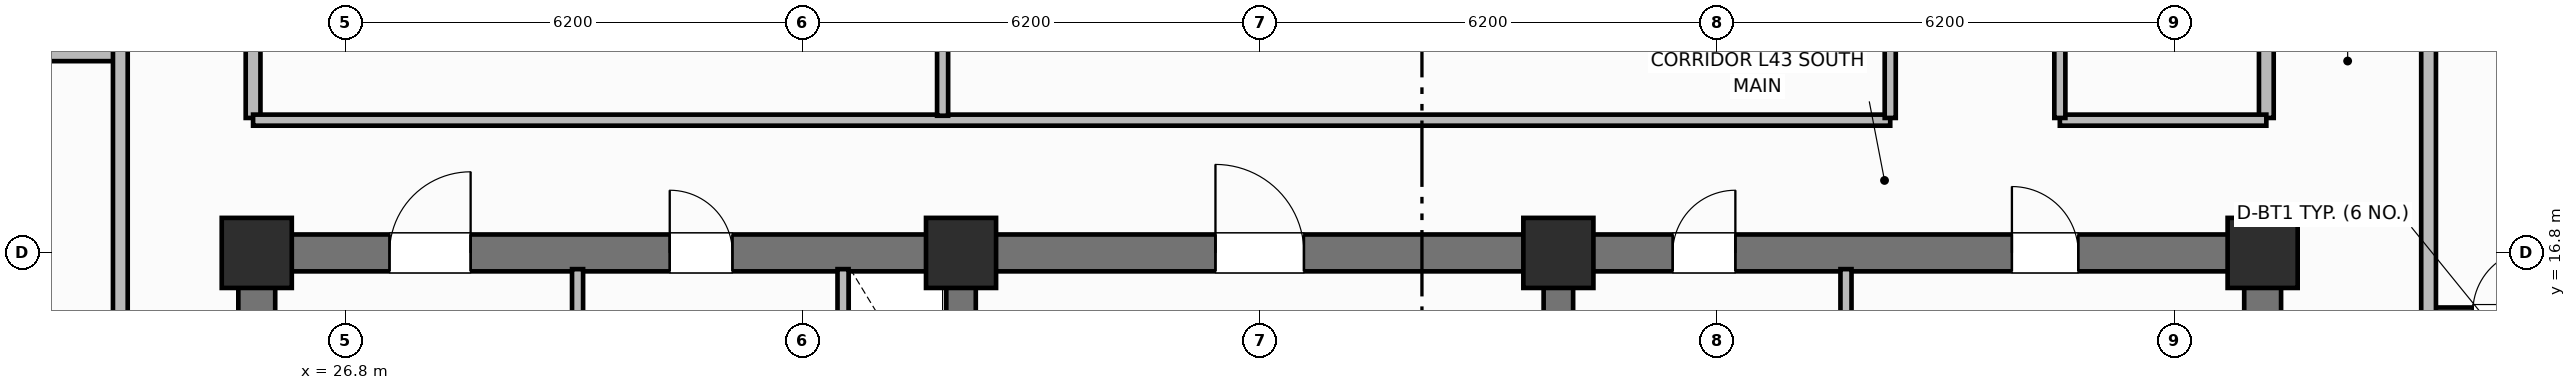
"""IFC4 building model, lengths in metres.
Left out: names, types, materials, properties, quantities, classifications, styles, units other than length and angle.
Written with IfcOpenShell. Run it as: python <this file> out.ifc"""

import sys

from ifc_helpers import new_model, si_unit, direction, frame, frame_2d, origin, origin_2d, place, context, subcontext, project, spatial, rectangle, extrude, element, fill, save


model = new_model("IFC4")
c1 = context("Model", 3, precision=1e-05, world=origin(), true_north=direction((0.0, 1.0)))
c2 = subcontext(c1, "Body", "Model", "MODEL_VIEW")
j1 = project(units=[si_unit("LENGTHUNIT", "METRE"), si_unit("PLANEANGLEUNIT", "RADIAN")], contexts=[c1])
p1 = place(None, origin())
s1 = spatial("IfcSite", under=j1, at=p1, CompositionType="ELEMENT")
p2 = place(p1, origin())
s2 = spatial("IfcBuilding", under=s1, at=p2, CompositionType="ELEMENT")
p3 = place(p2, frame((0.0, 0.0, 173.7)))
s3 = spatial("IfcBuildingStorey", under=s2, at=p3, CompositionType="ELEMENT", Elevation=173.7)
for number, where, z_axis, x_axis in (
    (1, (25.6, 10.85, 0.0), (0.0, 0.0, 1.0), (0.0, 1.0, 0.0)),
    (2, (52.8, 10.85, 0.0), (0.0, 0.0, 1.0), (0.0, 1.0, 0.0)),
):
    element("IfcWall", number, at=place(p3, frame(where, z_axis=z_axis, x_axis=x_axis)), inside=s3, PredefinedType="SHEAR", context=c2, shape_type="SweptSolid", body=[
        extrude(rectangle(XDim=5.7, YDim=0.5, at=frame_2d((2.85, 0.0))), origin(), (0.0, 0.0, 1.0), 3.7),
    ])
p4 = place(p3, frame((25.6, 16.8, 0.0), z_axis=(0.0, 0.0, 1.0), x_axis=(1.0, 0.0, 0.0)))
e3 = element("IfcWall", 3, at=p4, inside=s3, PredefinedType="SHEAR", context=c2, shape_type="SweptSolid", body=[
    extrude(rectangle(XDim=27.2, YDim=0.5, at=frame_2d((13.6, 0.0))), origin(), (0.0, 0.0, 1.0), 3.7),
])
p5 = place(p4, frame((1.8, 0.0, 0.0)))
e4 = element("IfcOpeningElement", 4, at=p5, cuts=e3, PredefinedType="OPENING", context=c2, shape_type="SweptSolid", body=[
    extrude(rectangle(XDim=1.1, YDim=2.15, at=frame_2d((0.55, 1.075))), frame((0.0, 0.26, 0.0), z_axis=(0.0, -1.0, 0.0), x_axis=(1.0, 0.0, 0.0)), (0.0, 0.0, 1.0), 0.52),
])
p6 = place(p4, frame((5.6, 0.0, 0.0)))
e5 = element("IfcOpeningElement", 5, at=p6, cuts=e3, PredefinedType="OPENING", context=c2, shape_type="SweptSolid", body=[
    extrude(rectangle(XDim=0.85, YDim=2.1, at=frame_2d((0.425, 1.05))), frame((0.0, 0.26, 0.0), z_axis=(0.0, -1.0, 0.0), x_axis=(1.0, 0.0, 0.0)), (0.0, 0.0, 1.0), 0.52),
])
p7 = place(p4, frame((13.0, 0.0, 0.0)))
e6 = element("IfcOpeningElement", 6, at=p7, cuts=e3, PredefinedType="OPENING", context=c2, shape_type="SweptSolid", body=[
    extrude(rectangle(XDim=1.2, YDim=2.15, at=frame_2d((0.6, 1.075))), frame((0.0, 0.26, 0.0), z_axis=(0.0, -1.0, 0.0), x_axis=(1.0, 0.0, 0.0)), (0.0, 0.0, 1.0), 0.52),
])
p8 = place(p4, frame((19.2, 0.0, 0.0)))
e7 = element("IfcOpeningElement", 7, at=p8, cuts=e3, PredefinedType="OPENING", context=c2, shape_type="SweptSolid", body=[
    extrude(rectangle(XDim=0.85, YDim=2.1, at=frame_2d((0.425, 1.05))), frame((0.0, 0.26, 0.0), z_axis=(0.0, -1.0, 0.0), x_axis=(1.0, 0.0, 0.0)), (0.0, 0.0, 1.0), 0.52),
])
p9 = place(p4, frame((23.8, 0.0, 0.0)))
e8 = element("IfcOpeningElement", 8, at=p9, cuts=e3, PredefinedType="OPENING", context=c2, shape_type="SweptSolid", body=[
    extrude(rectangle(XDim=0.9, YDim=2.1, at=frame_2d((0.45, 1.05))), frame((0.0, 0.26, 0.0), z_axis=(0.0, -1.0, 0.0), x_axis=(1.0, 0.0, 0.0)), (0.0, 0.0, 1.0), 0.52),
])
for number, where, z_axis, x_axis in (
    (9, (35.15, 10.85, 0.0), (0.0, 0.0, 1.0), (0.0, 1.0, 0.0)),
    (10, (43.25, 10.85, 0.0), (0.0, 0.0, 1.0), (0.0, 1.0, 0.0)),
):
    element("IfcWall", number, at=place(p3, frame(where, z_axis=z_axis, x_axis=x_axis)), inside=s3, PredefinedType="SHEAR", context=c2, shape_type="SweptSolid", body=[
        extrude(rectangle(XDim=5.7, YDim=0.4, at=frame_2d((2.85, 0.0))), origin(), (0.0, 0.0, 1.0), 3.7),
    ])
for number, where, z_axis, x_axis in (
    (11, (25.6, 16.8, 0.0), (0.0, 0.0, 1.0), (1.0, 0.0, 0.0)),
    (12, (35.15, 16.8, 0.0), (0.0, 0.0, 1.0), (1.0, 0.0, 0.0)),
    (13, (43.25, 16.8, 0.0), (0.0, 0.0, 1.0), (1.0, 0.0, 0.0)),
    (14, (52.8, 16.8, 0.0), (0.0, 0.0, 1.0), (1.0, 0.0, 0.0)),
):
    element("IfcColumn", number, at=place(p3, frame(where, z_axis=z_axis, x_axis=x_axis)), inside=s3, PredefinedType="COLUMN", context=c2, shape_type="SweptSolid", body=[
        extrude(rectangle(XDim=0.95, YDim=0.95, at=origin_2d()), origin(), (0.0, 0.0, 1.0), 3.7),
    ])
p10 = place(p3, frame((29.95, 14.5, 0.0), z_axis=(0.0, 0.0, 1.0), x_axis=(0.0, 1.0, 0.0)))
e15 = element("IfcWall", 15, at=p10, inside=s3, PredefinedType="PARTITIONING", context=c2, shape_type="SweptSolid", body=[
    extrude(rectangle(XDim=2.08, YDim=0.15, at=frame_2d((1.04, 0.0))), origin(), (0.0, 0.0, 1.0), 2.55),
])
p11 = place(p3, frame((33.55, 14.5, 0.0), z_axis=(0.0, 0.0, 1.0), x_axis=(0.0, 1.0, 0.0)))
e16 = element("IfcWall", 16, at=p11, inside=s3, PredefinedType="PARTITIONING", context=c2, shape_type="SweptSolid", body=[
    extrude(rectangle(XDim=2.08, YDim=0.15, at=frame_2d((1.04, 0.0))), origin(), (0.0, 0.0, 1.0), 2.55),
])
p12 = place(p11, frame((0.55, 0.0, 0.0)))
e17 = element("IfcOpeningElement", 17, at=p12, cuts=e16, PredefinedType="OPENING", context=c2, shape_type="SweptSolid", body=[
    extrude(rectangle(XDim=0.85, YDim=2.05, at=frame_2d((0.425, 1.025))), frame((0.0, 0.085, 0.0), z_axis=(0.0, -1.0, 0.0), x_axis=(1.0, 0.0, 0.0)), (0.0, 0.0, 1.0), 0.17),
])
p13 = place(p3, frame((47.15, 10.95, 0.0), z_axis=(0.0, 0.0, 1.0), x_axis=(0.0, 1.0, 0.0)))
e18 = element("IfcWall", 18, at=p13, inside=s3, PredefinedType="PARTITIONING", context=c2, shape_type="SweptSolid", body=[
    extrude(rectangle(XDim=5.63, YDim=0.15, at=frame_2d((2.815, 0.0))), origin(), (0.0, 0.0, 1.0), 2.55),
])
for number, where, z_axis, x_axis in (
    (19, (25.55, 18.63, 0.0), (0.0, 0.0, 1.0), (0.0, 1.0, 0.0)),
    (20, (52.85, 18.63, 0.0), (0.0, 0.0, 1.0), (0.0, 1.0, 0.0)),
):
    element("IfcWall", number, at=place(p3, frame(where, z_axis=z_axis, x_axis=x_axis)), inside=s3, PredefinedType="PARTITIONING", context=c2, shape_type="SweptSolid", body=[
        extrude(rectangle(XDim=19.14, YDim=0.2, at=frame_2d((9.57, 0.0))), origin(), (0.0, 0.0, 1.0), 2.55),
    ])
p14 = place(p3, frame((25.55, 18.6, 0.0), z_axis=(0.0, 0.0, 1.0), x_axis=(1.0, 0.0, 0.0)))
e21 = element("IfcWall", 21, at=p14, inside=s3, PredefinedType="PARTITIONING", context=c2, shape_type="SweptSolid", body=[
    extrude(rectangle(XDim=22.2, YDim=0.15, at=frame_2d((11.1, 0.0))), origin(), (0.0, 0.0, 1.0), 2.55),
])
p15 = place(p3, frame((50.05, 18.6, 0.0), z_axis=(0.0, 0.0, 1.0), x_axis=(1.0, 0.0, 0.0)))
e22 = element("IfcWall", 22, at=p15, inside=s3, PredefinedType="PARTITIONING", context=c2, shape_type="SweptSolid", body=[
    extrude(rectangle(XDim=2.8, YDim=0.15, at=frame_2d((1.4, 0.0))), origin(), (0.0, 0.0, 1.0), 2.55),
])
p16 = place(p3, frame((34.9, 18.66, 0.0), z_axis=(0.0, 0.0, 1.0), x_axis=(0.0, 1.0, 0.0)))
e23 = element("IfcWall", 23, at=p16, inside=s3, PredefinedType="PARTITIONING", context=c2, shape_type="SweptSolid", body=[
    extrude(rectangle(XDim=19.08, YDim=0.15, at=frame_2d((9.54, 0.0))), origin(), (0.0, 0.0, 1.0), 2.55),
])
p17 = place(p16, frame((5.0, 0.0, 0.0)))
e24 = element("IfcOpeningElement", 24, at=p17, cuts=e23, PredefinedType="OPENING", context=c2, shape_type="SweptSolid", body=[
    extrude(rectangle(XDim=1.0, YDim=2.15, at=frame_2d((0.5, 1.075))), frame((0.0, 0.085, 0.0), z_axis=(0.0, -1.0, 0.0), x_axis=(1.0, 0.0, 0.0)), (0.0, 0.0, 1.0), 0.17),
])
p18 = place(p3, frame((47.75, 18.63, 0.0), z_axis=(0.0, 0.0, 1.0), x_axis=(0.0, 1.0, 0.0)))
e25 = element("IfcWall", 25, at=p18, inside=s3, PredefinedType="PARTITIONING", context=c2, shape_type="SweptSolid", body=[
    extrude(rectangle(XDim=19.14, YDim=0.15, at=frame_2d((9.57, 0.0))), origin(), (0.0, 0.0, 1.0), 2.55),
])
p19 = place(p18, frame((2.4, 0.0, 0.0)))
e26 = element("IfcOpeningElement", 26, at=p19, cuts=e25, PredefinedType="OPENING", context=c2, shape_type="SweptSolid", body=[
    extrude(rectangle(XDim=0.9, YDim=2.1, at=frame_2d((0.45, 1.05))), frame((0.0, 0.085, 0.0), z_axis=(0.0, -1.0, 0.0), x_axis=(1.0, 0.0, 0.0)), (0.0, 0.0, 1.0), 0.17),
])
p20 = place(p18, frame((10.804, 0.0, 0.0)))
e27 = element("IfcOpeningElement", 27, at=p20, cuts=e25, PredefinedType="OPENING", context=c2, shape_type="SweptSolid", body=[
    extrude(rectangle(XDim=0.9, YDim=2.1, at=frame_2d((0.45, 1.05))), frame((0.0, 0.085, 0.0), z_axis=(0.0, -1.0, 0.0), x_axis=(1.0, 0.0, 0.0)), (0.0, 0.0, 1.0), 0.17),
])
p21 = place(p3, frame((50.05, 18.63, 0.0), z_axis=(0.0, 0.0, 1.0), x_axis=(0.0, 1.0, 0.0)))
e28 = element("IfcWall", 28, at=p21, inside=s3, PredefinedType="PARTITIONING", context=c2, shape_type="SweptSolid", body=[
    extrude(rectangle(XDim=19.14, YDim=0.15, at=frame_2d((9.57, 0.0))), origin(), (0.0, 0.0, 1.0), 2.55),
])
p22 = place(p21, frame((2.4, 0.0, 0.0)))
e29 = element("IfcOpeningElement", 29, at=p22, cuts=e28, PredefinedType="OPENING", context=c2, shape_type="SweptSolid", body=[
    extrude(rectangle(XDim=1.0, YDim=2.15, at=frame_2d((0.5, 1.075))), frame((0.0, 0.085, 0.0), z_axis=(0.0, -1.0, 0.0), x_axis=(1.0, 0.0, 0.0)), (0.0, 0.0, 1.0), 0.17),
])
p23 = place(p21, frame((10.804, 0.0, 0.0)))
e30 = element("IfcOpeningElement", 30, at=p23, cuts=e28, PredefinedType="OPENING", context=c2, shape_type="SweptSolid", body=[
    extrude(rectangle(XDim=1.0, YDim=2.15, at=frame_2d((0.5, 1.075))), frame((0.0, 0.085, 0.0), z_axis=(0.0, -1.0, 0.0), x_axis=(1.0, 0.0, 0.0)), (0.0, 0.0, 1.0), 0.17),
])
p24 = place(p3, frame((16.57, 19.5, 0.0), z_axis=(0.0, 0.0, 1.0), x_axis=(1.0, 0.0, 0.0)))
e31 = element("IfcWall", 31, at=p24, inside=s3, PredefinedType="PARTITIONING", context=c2, shape_type="SweptSolid", body=[
    extrude(rectangle(XDim=7.18, YDim=0.2, at=frame_2d((3.59, 0.0))), origin(), (0.0, 0.0, 1.0), 2.55),
])
p25 = place(p3, frame((23.75, 10.6, 0.0), z_axis=(0.0, 0.0, 1.0), x_axis=(0.0, 1.0, 0.0)))
e32 = element("IfcWall", 32, at=p25, inside=s3, PredefinedType="PARTITIONING", context=c2, shape_type="SweptSolid", body=[
    extrude(rectangle(XDim=35.2, YDim=0.2, at=frame_2d((17.6, 0.0))), origin(), (0.0, 0.0, 1.0), 2.55),
])
p26 = place(p25, frame((2.65, 0.0, 0.0)))
e33 = element("IfcOpeningElement", 33, at=p26, cuts=e32, PredefinedType="OPENING", context=c2, shape_type="SweptSolid", body=[
    extrude(rectangle(XDim=1.0, YDim=2.15, at=frame_2d((0.5, 1.075))), frame((0.0, 0.11, 0.0), z_axis=(0.0, -1.0, 0.0), x_axis=(1.0, 0.0, 0.0)), (0.0, 0.0, 1.0), 0.22),
])
p27 = place(p25, frame((11.4, 0.0, 0.0)))
e34 = element("IfcOpeningElement", 34, at=p27, cuts=e32, PredefinedType="OPENING", context=c2, shape_type="SweptSolid", body=[
    extrude(rectangle(XDim=1.0, YDim=2.15, at=frame_2d((0.5, 1.075))), frame((0.0, 0.11, 0.0), z_axis=(0.0, -1.0, 0.0), x_axis=(1.0, 0.0, 0.0)), (0.0, 0.0, 1.0), 0.22),
])
p28 = place(p25, frame((21.37, 0.0, 0.0)))
e35 = element("IfcOpeningElement", 35, at=p28, cuts=e32, PredefinedType="OPENING", context=c2, shape_type="SweptSolid", body=[
    extrude(rectangle(XDim=1.0, YDim=2.15, at=frame_2d((0.5, 1.075))), frame((0.0, 0.11, 0.0), z_axis=(0.0, -1.0, 0.0), x_axis=(1.0, 0.0, 0.0)), (0.0, 0.0, 1.0), 0.22),
])
p29 = place(p25, frame((27.302, 0.0, 0.0)))
e36 = element("IfcOpeningElement", 36, at=p29, cuts=e32, PredefinedType="OPENING", context=c2, shape_type="SweptSolid", body=[
    extrude(rectangle(XDim=1.0, YDim=2.15, at=frame_2d((0.5, 1.075))), frame((0.0, 0.11, 0.0), z_axis=(0.0, -1.0, 0.0), x_axis=(1.0, 0.0, 0.0)), (0.0, 0.0, 1.0), 0.22),
])
p30 = place(p3, frame((55.05, 16.0, 0.0), z_axis=(0.0, 0.0, 1.0), x_axis=(1.0, 0.0, 0.0)))
e37 = element("IfcWall", 37, at=p30, inside=s3, PredefinedType="PARTITIONING", context=c2, shape_type="SweptSolid", body=[
    extrude(rectangle(XDim=2.25, YDim=0.12, at=frame_2d((1.125, 0.0))), origin(), (0.0, 0.0, 1.0), 2.55),
])
p31 = place(p30, frame((0.6, 0.0, 0.0)))
e38 = element("IfcOpeningElement", 38, at=p31, cuts=e37, PredefinedType="OPENING", context=c2, shape_type="SweptSolid", body=[
    extrude(rectangle(XDim=0.85, YDim=2.1, at=frame_2d((0.425, 1.05))), frame((0.0, 0.07, 0.0), z_axis=(0.0, -1.0, 0.0), x_axis=(1.0, 0.0, 0.0)), (0.0, 0.0, 1.0), 0.14),
])
p32 = place(p3, frame((55.05, 10.6, 0.0), z_axis=(0.0, 0.0, 1.0), x_axis=(0.0, 1.0, 0.0)))
e39 = element("IfcWall", 39, at=p32, inside=s3, PredefinedType="PARTITIONING", context=c2, shape_type="SweptSolid", body=[
    extrude(rectangle(XDim=35.2, YDim=0.2, at=frame_2d((17.6, 0.0))), origin(), (0.0, 0.0, 1.0), 2.55),
])
p33 = place(p32, frame((2.65, 0.0, 0.0)))
e40 = element("IfcOpeningElement", 40, at=p33, cuts=e39, PredefinedType="OPENING", context=c2, shape_type="SweptSolid", body=[
    extrude(rectangle(XDim=1.0, YDim=2.15, at=frame_2d((0.5, 1.075))), frame((0.0, 0.11, 0.0), z_axis=(0.0, -1.0, 0.0), x_axis=(1.0, 0.0, 0.0)), (0.0, 0.0, 1.0), 0.22),
])
p34 = place(p32, frame((19.95, 0.0, 0.0)))
e41 = element("IfcOpeningElement", 41, at=p34, cuts=e39, PredefinedType="OPENING", context=c2, shape_type="SweptSolid", body=[
    extrude(rectangle(XDim=1.0, YDim=2.15, at=frame_2d((0.5, 1.075))), frame((0.0, 0.11, 0.0), z_axis=(0.0, -1.0, 0.0), x_axis=(1.0, 0.0, 0.0)), (0.0, 0.0, 1.0), 0.22),
])
p35 = place(p31, origin())
e42 = element("IfcDoor", 42, at=p35, inside=s3, OperationType="SINGLE_SWING_RIGHT", PredefinedType="DOOR", context=c2, shape_type="SweptSolid", body=[
    extrude(rectangle(XDim=0.85, YDim=2.1, at=frame_2d((0.425, 1.05))), frame((0.0, 0.025, 0.0), z_axis=(0.0, -1.0, 0.0), x_axis=(1.0, 0.0, 0.0)), (0.0, 0.0, 1.0), 0.05),
])
fill(e38, e42)
p36 = place(p5, origin())
e43 = element("IfcDoor", 43, at=p36, inside=s3, OperationType="SINGLE_SWING_RIGHT", PredefinedType="DOOR", context=c2, shape_type="SweptSolid", body=[
    extrude(rectangle(XDim=1.1, YDim=2.15, at=frame_2d((0.55, 1.075))), frame((0.0, 0.025, 0.0), z_axis=(0.0, -1.0, 0.0), x_axis=(1.0, 0.0, 0.0)), (0.0, 0.0, 1.0), 0.05),
])
fill(e4, e43)
p37 = place(p6, origin())
e44 = element("IfcDoor", 44, at=p37, inside=s3, OperationType="SINGLE_SWING_LEFT", PredefinedType="DOOR", context=c2, shape_type="SweptSolid", body=[
    extrude(rectangle(XDim=0.85, YDim=2.1, at=frame_2d((0.425, 1.05))), frame((0.0, 0.025, 0.0), z_axis=(0.0, -1.0, 0.0), x_axis=(1.0, 0.0, 0.0)), (0.0, 0.0, 1.0), 0.05),
])
fill(e5, e44)
p38 = place(p7, origin())
e45 = element("IfcDoor", 45, at=p38, inside=s3, OperationType="SINGLE_SWING_LEFT", PredefinedType="DOOR", context=c2, shape_type="SweptSolid", body=[
    extrude(rectangle(XDim=1.2, YDim=2.15, at=frame_2d((0.6, 1.075))), frame((0.0, 0.025, 0.0), z_axis=(0.0, -1.0, 0.0), x_axis=(1.0, 0.0, 0.0)), (0.0, 0.0, 1.0), 0.05),
])
fill(e6, e45)
p39 = place(p8, origin())
e46 = element("IfcDoor", 46, at=p39, inside=s3, OperationType="SINGLE_SWING_RIGHT", PredefinedType="DOOR", context=c2, shape_type="SweptSolid", body=[
    extrude(rectangle(XDim=0.85, YDim=2.1, at=frame_2d((0.425, 1.05))), frame((0.0, 0.025, 0.0), z_axis=(0.0, -1.0, 0.0), x_axis=(1.0, 0.0, 0.0)), (0.0, 0.0, 1.0), 0.05),
])
fill(e7, e46)
p40 = place(p9, origin())
e47 = element("IfcDoor", 47, at=p40, inside=s3, OperationType="SINGLE_SWING_LEFT", PredefinedType="DOOR", context=c2, shape_type="SweptSolid", body=[
    extrude(rectangle(XDim=0.9, YDim=2.1, at=frame_2d((0.45, 1.05))), frame((0.0, 0.025, 0.0), z_axis=(0.0, -1.0, 0.0), x_axis=(1.0, 0.0, 0.0)), (0.0, 0.0, 1.0), 0.05),
])
fill(e8, e47)
save(model, sys.argv[1])
